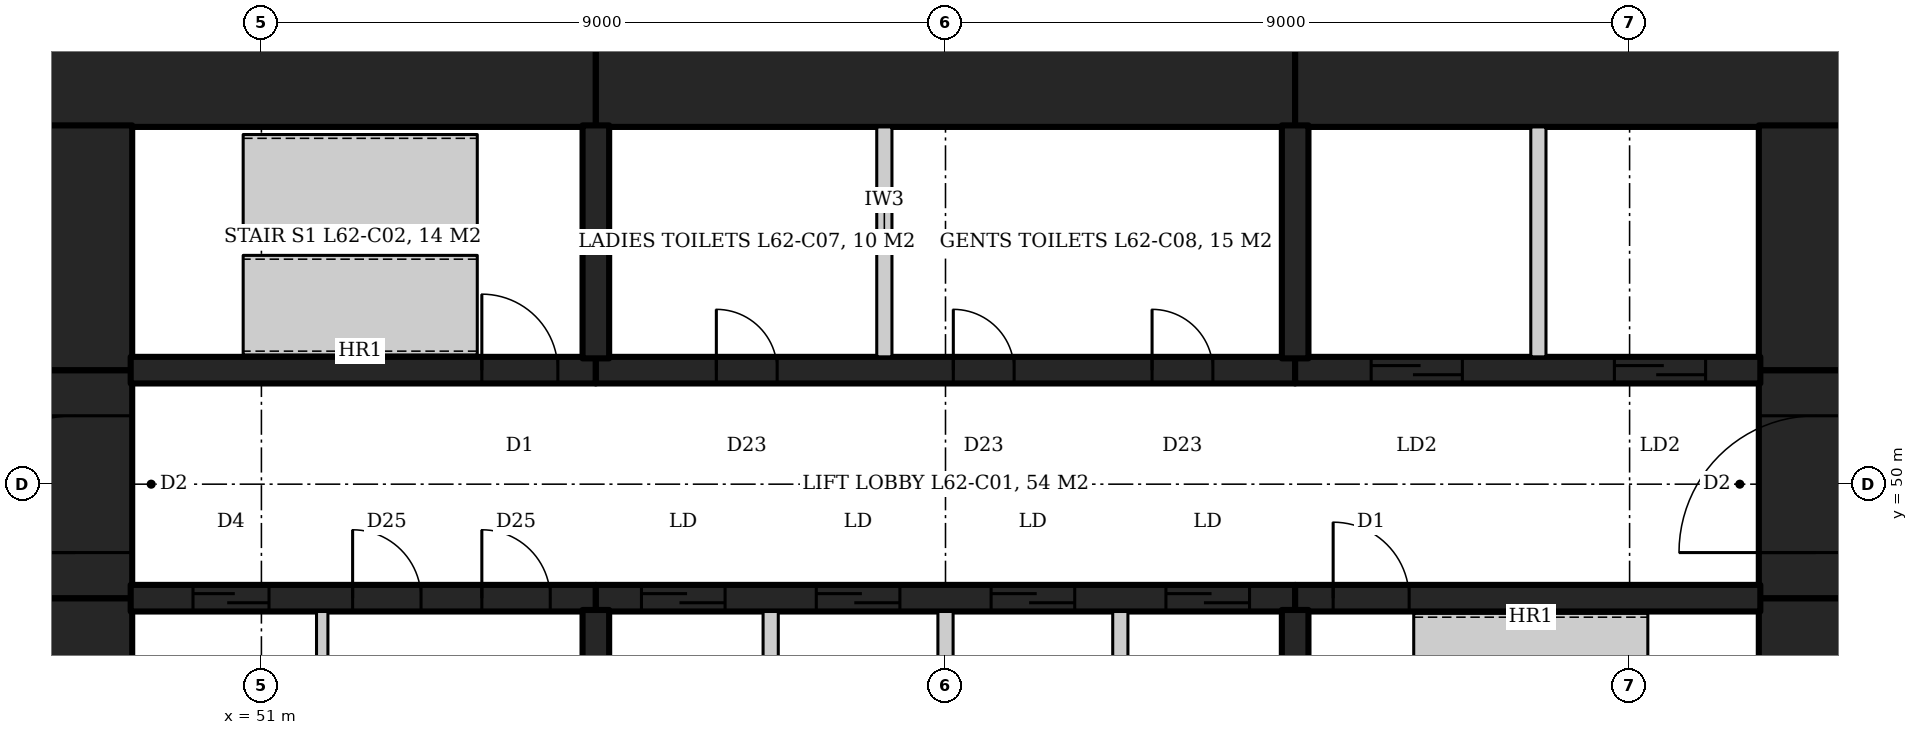
"""IFC4 building model, lengths in metres.
Left out: names, types, materials, properties, quantities, classifications, styles, units other than length and angle.
Written with IfcOpenShell. Run it as: python <this file> out.ifc"""

import sys

from ifc_helpers import new_model, si_unit, direction, frame, frame_2d, origin, place, context, subcontext, project, spatial, rectangle, extrude, element, fill, save


model = new_model("IFC4")
c1 = context("Model", 3, precision=1e-05, world=origin(), true_north=direction((0.0, 1.0)))
c2 = subcontext(c1, "Body", "Model", "MODEL_VIEW")
j1 = project(units=[si_unit("LENGTHUNIT", "METRE"), si_unit("PLANEANGLEUNIT", "RADIAN")], contexts=[c1])
p1 = place(None, origin())
s1 = spatial("IfcSite", under=j1, at=p1, CompositionType="ELEMENT")
p2 = place(p1, origin())
s2 = spatial("IfcBuilding", under=s1, at=p2, CompositionType="ELEMENT")
p3 = place(p2, frame((0.0, 0.0, 269.6)))
s3 = spatial("IfcBuildingStorey", under=s2, at=p3, CompositionType="ELEMENT", Elevation=269.6)
p4 = place(p3, frame((47.8, 55.45, 0.0), z_axis=(0.0, 0.0, 1.0), x_axis=(1.0, 0.0, 0.0)))
e1 = element("IfcWall", 1, at=p4, inside=s3, PredefinedType="SHEAR", context=c2, shape_type="SweptSolid", body=[
    extrude(rectangle(XDim=7.6, YDim=1.5, at=frame_2d((3.8, 0.0))), origin(), (0.0, 0.0, 1.0), 4.2),
])
p5 = place(p3, frame((55.4, 55.45, 0.0), z_axis=(0.0, 0.0, 1.0), x_axis=(1.0, 0.0, 0.0)))
e2 = element("IfcWall", 2, at=p5, inside=s3, PredefinedType="SHEAR", context=c2, shape_type="SweptSolid", body=[
    extrude(rectangle(XDim=9.2, YDim=1.5, at=frame_2d((4.6, 0.0))), origin(), (0.0, 0.0, 1.0), 4.2),
])
p6 = place(p3, frame((64.6, 55.45, 0.0), z_axis=(0.0, 0.0, 1.0), x_axis=(1.0, 0.0, 0.0)))
e3 = element("IfcWall", 3, at=p6, inside=s3, PredefinedType="SHEAR", context=c2, shape_type="SweptSolid", body=[
    extrude(rectangle(XDim=7.6, YDim=1.5, at=frame_2d((3.8, 0.0))), origin(), (0.0, 0.0, 1.0), 4.2),
])
p7 = place(p3, frame((71.45, 45.28, 0.0), z_axis=(0.0, 0.0, 1.0), x_axis=(0.0, 1.0, 0.0)))
e4 = element("IfcWall", 4, at=p7, inside=s3, PredefinedType="SHEAR", context=c2, shape_type="SweptSolid", body=[
    extrude(rectangle(XDim=3.22, YDim=1.5, at=frame_2d((1.61, 0.0))), origin(), (0.0, 0.0, 1.0), 4.2),
])
p8 = place(p3, frame((71.45, 48.5, 0.0), z_axis=(0.0, 0.0, 1.0), x_axis=(0.0, 1.0, 0.0)))
e5 = element("IfcWall", 5, at=p8, inside=s3, PredefinedType="SHEAR", context=c2, shape_type="SweptSolid", body=[
    extrude(rectangle(XDim=3.0, YDim=1.5, at=frame_2d((1.5, 0.0))), origin(), (0.0, 0.0, 1.0), 4.2),
])
p9 = place(p8, frame((0.6, 0.0, 0.0)))
e6 = element("IfcOpeningElement", 6, at=p9, cuts=e5, PredefinedType="OPENING", context=c2, shape_type="SweptSolid", body=[
    extrude(rectangle(XDim=1.8, YDim=2.1, at=frame_2d((0.9, 1.05))), frame((0.0, 0.76, 0.0), z_axis=(0.0, -1.0, 0.0), x_axis=(1.0, 0.0, 0.0)), (0.0, 0.0, 1.0), 1.52),
])
for number, where, z_axis, x_axis in (
    (7, (71.45, 51.5, 0.0), (0.0, 0.0, 1.0), (0.0, 1.0, 0.0)),
    (8, (48.55, 45.28, 0.0), (0.0, 0.0, 1.0), (0.0, 1.0, 0.0)),
):
    element("IfcWall", number, at=place(p3, frame(where, z_axis=z_axis, x_axis=x_axis)), inside=s3, PredefinedType="SHEAR", context=c2, shape_type="SweptSolid", body=[
        extrude(rectangle(XDim=3.22, YDim=1.5, at=frame_2d((1.61, 0.0))), origin(), (0.0, 0.0, 1.0), 4.2),
    ])
p10 = place(p3, frame((48.55, 48.5, 0.0), z_axis=(0.0, 0.0, 1.0), x_axis=(0.0, 1.0, 0.0)))
e9 = element("IfcWall", 9, at=p10, inside=s3, PredefinedType="SHEAR", context=c2, shape_type="SweptSolid", body=[
    extrude(rectangle(XDim=3.0, YDim=1.5, at=frame_2d((1.5, 0.0))), origin(), (0.0, 0.0, 1.0), 4.2),
])
p11 = place(p10, frame((0.6, 0.0, 0.0)))
e10 = element("IfcOpeningElement", 10, at=p11, cuts=e9, PredefinedType="OPENING", context=c2, shape_type="SweptSolid", body=[
    extrude(rectangle(XDim=1.8, YDim=2.1, at=frame_2d((0.9, 1.05))), frame((0.0, 0.76, 0.0), z_axis=(0.0, -1.0, 0.0), x_axis=(1.0, 0.0, 0.0)), (0.0, 0.0, 1.0), 1.52),
])
p12 = place(p3, frame((48.55, 51.5, 0.0), z_axis=(0.0, 0.0, 1.0), x_axis=(0.0, 1.0, 0.0)))
e11 = element("IfcWall", 11, at=p12, inside=s3, PredefinedType="SHEAR", context=c2, shape_type="SweptSolid", body=[
    extrude(rectangle(XDim=3.22, YDim=1.5, at=frame_2d((1.61, 0.0))), origin(), (0.0, 0.0, 1.0), 4.2),
])
p13 = place(p3, frame((49.28, 51.5, 0.0), z_axis=(0.0, 0.0, 1.0), x_axis=(1.0, 0.0, 0.0)))
e12 = element("IfcWall", 12, at=p13, inside=s3, PredefinedType="SHEAR", context=c2, shape_type="SweptSolid", body=[
    extrude(rectangle(XDim=6.12, YDim=0.35, at=frame_2d((3.06, 0.0))), origin(), (0.0, 0.0, 1.0), 4.2),
])
p14 = place(p13, frame((4.62, 0.0, 0.0)))
e13 = element("IfcOpeningElement", 13, at=p14, cuts=e12, PredefinedType="OPENING", context=c2, shape_type="SweptSolid", body=[
    extrude(rectangle(XDim=1.0, YDim=2.1, at=frame_2d((0.5, 1.05))), frame((0.0, 0.185, 0.0), z_axis=(0.0, -1.0, 0.0), x_axis=(1.0, 0.0, 0.0)), (0.0, 0.0, 1.0), 0.37),
])
p15 = place(p3, frame((55.4, 51.5, 0.0), z_axis=(0.0, 0.0, 1.0), x_axis=(1.0, 0.0, 0.0)))
e14 = element("IfcWall", 14, at=p15, inside=s3, PredefinedType="SHEAR", context=c2, shape_type="SweptSolid", body=[
    extrude(rectangle(XDim=9.2, YDim=0.35, at=frame_2d((4.6, 0.0))), origin(), (0.0, 0.0, 1.0), 4.2),
])
p16 = place(p15, frame((1.585, 0.0, 0.0)))
e15 = element("IfcOpeningElement", 15, at=p16, cuts=e14, PredefinedType="OPENING", context=c2, shape_type="SweptSolid", body=[
    extrude(rectangle(XDim=0.8, YDim=2.1, at=frame_2d((0.4, 1.05))), frame((0.0, 0.185, 0.0), z_axis=(0.0, -1.0, 0.0), x_axis=(1.0, 0.0, 0.0)), (0.0, 0.0, 1.0), 0.37),
])
p17 = place(p15, frame((4.703, 0.0, 0.0)))
e16 = element("IfcOpeningElement", 16, at=p17, cuts=e14, PredefinedType="OPENING", context=c2, shape_type="SweptSolid", body=[
    extrude(rectangle(XDim=0.8, YDim=2.1, at=frame_2d((0.4, 1.05))), frame((0.0, 0.185, 0.0), z_axis=(0.0, -1.0, 0.0), x_axis=(1.0, 0.0, 0.0)), (0.0, 0.0, 1.0), 0.37),
])
p18 = place(p15, frame((7.318, 0.0, 0.0)))
e17 = element("IfcOpeningElement", 17, at=p18, cuts=e14, PredefinedType="OPENING", context=c2, shape_type="SweptSolid", body=[
    extrude(rectangle(XDim=0.8, YDim=2.1, at=frame_2d((0.4, 1.05))), frame((0.0, 0.185, 0.0), z_axis=(0.0, -1.0, 0.0), x_axis=(1.0, 0.0, 0.0)), (0.0, 0.0, 1.0), 0.37),
])
p19 = place(p3, frame((64.6, 51.5, 0.0), z_axis=(0.0, 0.0, 1.0), x_axis=(1.0, 0.0, 0.0)))
e18 = element("IfcWall", 18, at=p19, inside=s3, PredefinedType="SHEAR", context=c2, shape_type="SweptSolid", body=[
    extrude(rectangle(XDim=6.12, YDim=0.35, at=frame_2d((3.06, 0.0))), origin(), (0.0, 0.0, 1.0), 4.2),
])
p20 = place(p19, frame((1.0, 0.0, 0.0)))
e19 = element("IfcOpeningElement", 19, at=p20, cuts=e18, PredefinedType="OPENING", context=c2, shape_type="SweptSolid", body=[
    extrude(rectangle(XDim=1.2, YDim=2.1, at=frame_2d((0.6, 1.05))), frame((0.0, 0.185, 0.0), z_axis=(0.0, -1.0, 0.0), x_axis=(1.0, 0.0, 0.0)), (0.0, 0.0, 1.0), 0.37),
])
p21 = place(p19, frame((4.2, 0.0, 0.0)))
e20 = element("IfcOpeningElement", 20, at=p21, cuts=e18, PredefinedType="OPENING", context=c2, shape_type="SweptSolid", body=[
    extrude(rectangle(XDim=1.2, YDim=2.1, at=frame_2d((0.6, 1.05))), frame((0.0, 0.185, 0.0), z_axis=(0.0, -1.0, 0.0), x_axis=(1.0, 0.0, 0.0)), (0.0, 0.0, 1.0), 0.37),
])
p22 = place(p3, frame((49.28, 48.5, 0.0), z_axis=(0.0, 0.0, 1.0), x_axis=(1.0, 0.0, 0.0)))
e21 = element("IfcWall", 21, at=p22, inside=s3, PredefinedType="SHEAR", context=c2, shape_type="SweptSolid", body=[
    extrude(rectangle(XDim=6.12, YDim=0.35, at=frame_2d((3.06, 0.0))), origin(), (0.0, 0.0, 1.0), 4.2),
])
p23 = place(p22, frame((0.82, 0.0, 0.0)))
e22 = element("IfcOpeningElement", 22, at=p23, cuts=e21, PredefinedType="OPENING", context=c2, shape_type="SweptSolid", body=[
    extrude(rectangle(XDim=1.0, YDim=2.1, at=frame_2d((0.5, 1.05))), frame((0.0, 0.185, 0.0), z_axis=(0.0, -1.0, 0.0), x_axis=(1.0, 0.0, 0.0)), (0.0, 0.0, 1.0), 0.37),
])
p24 = place(p22, frame((2.92, 0.0, 0.0)))
e23 = element("IfcOpeningElement", 23, at=p24, cuts=e21, PredefinedType="OPENING", context=c2, shape_type="SweptSolid", body=[
    extrude(rectangle(XDim=0.9, YDim=2.1, at=frame_2d((0.45, 1.05))), frame((0.0, 0.185, 0.0), z_axis=(0.0, -1.0, 0.0), x_axis=(1.0, 0.0, 0.0)), (0.0, 0.0, 1.0), 0.37),
])
p25 = place(p22, frame((4.62, 0.0, 0.0)))
e24 = element("IfcOpeningElement", 24, at=p25, cuts=e21, PredefinedType="OPENING", context=c2, shape_type="SweptSolid", body=[
    extrude(rectangle(XDim=0.9, YDim=2.1, at=frame_2d((0.45, 1.05))), frame((0.0, 0.185, 0.0), z_axis=(0.0, -1.0, 0.0), x_axis=(1.0, 0.0, 0.0)), (0.0, 0.0, 1.0), 0.37),
])
p26 = place(p3, frame((55.4, 48.5, 0.0), z_axis=(0.0, 0.0, 1.0), x_axis=(1.0, 0.0, 0.0)))
e25 = element("IfcWall", 25, at=p26, inside=s3, PredefinedType="SHEAR", context=c2, shape_type="SweptSolid", body=[
    extrude(rectangle(XDim=9.2, YDim=0.35, at=frame_2d((4.6, 0.0))), origin(), (0.0, 0.0, 1.0), 4.2),
])
p27 = place(p26, frame((0.6, 0.0, 0.0)))
e26 = element("IfcOpeningElement", 26, at=p27, cuts=e25, PredefinedType="OPENING", context=c2, shape_type="SweptSolid", body=[
    extrude(rectangle(XDim=1.1, YDim=2.1, at=frame_2d((0.55, 1.05))), frame((0.0, 0.185, 0.0), z_axis=(0.0, -1.0, 0.0), x_axis=(1.0, 0.0, 0.0)), (0.0, 0.0, 1.0), 0.37),
])
p28 = place(p26, frame((2.9, 0.0, 0.0)))
e27 = element("IfcOpeningElement", 27, at=p28, cuts=e25, PredefinedType="OPENING", context=c2, shape_type="SweptSolid", body=[
    extrude(rectangle(XDim=1.1, YDim=2.1, at=frame_2d((0.55, 1.05))), frame((0.0, 0.185, 0.0), z_axis=(0.0, -1.0, 0.0), x_axis=(1.0, 0.0, 0.0)), (0.0, 0.0, 1.0), 0.37),
])
p29 = place(p26, frame((5.2, 0.0, 0.0)))
e28 = element("IfcOpeningElement", 28, at=p29, cuts=e25, PredefinedType="OPENING", context=c2, shape_type="SweptSolid", body=[
    extrude(rectangle(XDim=1.1, YDim=2.1, at=frame_2d((0.55, 1.05))), frame((0.0, 0.185, 0.0), z_axis=(0.0, -1.0, 0.0), x_axis=(1.0, 0.0, 0.0)), (0.0, 0.0, 1.0), 0.37),
])
p30 = place(p26, frame((7.5, 0.0, 0.0)))
e29 = element("IfcOpeningElement", 29, at=p30, cuts=e25, PredefinedType="OPENING", context=c2, shape_type="SweptSolid", body=[
    extrude(rectangle(XDim=1.1, YDim=2.1, at=frame_2d((0.55, 1.05))), frame((0.0, 0.185, 0.0), z_axis=(0.0, -1.0, 0.0), x_axis=(1.0, 0.0, 0.0)), (0.0, 0.0, 1.0), 0.37),
])
p31 = place(p3, frame((64.6, 48.5, 0.0), z_axis=(0.0, 0.0, 1.0), x_axis=(1.0, 0.0, 0.0)))
e30 = element("IfcWall", 30, at=p31, inside=s3, PredefinedType="SHEAR", context=c2, shape_type="SweptSolid", body=[
    extrude(rectangle(XDim=6.12, YDim=0.35, at=frame_2d((3.06, 0.0))), origin(), (0.0, 0.0, 1.0), 4.2),
])
p32 = place(p31, frame((0.5, 0.0, 0.0)))
e31 = element("IfcOpeningElement", 31, at=p32, cuts=e30, PredefinedType="OPENING", context=c2, shape_type="SweptSolid", body=[
    extrude(rectangle(XDim=1.0, YDim=2.1, at=frame_2d((0.5, 1.05))), frame((0.0, 0.185, 0.0), z_axis=(0.0, -1.0, 0.0), x_axis=(1.0, 0.0, 0.0)), (0.0, 0.0, 1.0), 0.37),
])
for number, where, z_axis, x_axis in (
    (32, (55.4, 51.655, 0.0), (0.0, 0.0, 1.0), (0.0, 1.0, 0.0)),
    (33, (64.6, 51.655, 0.0), (0.0, 0.0, 1.0), (0.0, 1.0, 0.0)),
    (34, (55.4, 48.345, 0.0), (0.0, 0.0, 1.0), (0.0, -1.0, 0.0)),
    (35, (64.6, 48.345, 0.0), (0.0, 0.0, 1.0), (0.0, -1.0, 0.0)),
):
    element("IfcWall", number, at=place(p3, frame(where, z_axis=z_axis, x_axis=x_axis)), inside=s3, PredefinedType="SHEAR", context=c2, shape_type="SweptSolid", body=[
        extrude(rectangle(XDim=3.065, YDim=0.35, at=frame_2d((1.532, 0.0))), origin(), (0.0, 0.0, 1.0), 4.2),
    ])
for number, where, z_axis, x_axis in (
    (36, (57.7, 45.3, 0.0), (0.0, 0.0, 1.0), (0.0, 1.0, 0.0)),
    (37, (60.0, 45.3, 0.0), (0.0, 0.0, 1.0), (0.0, 1.0, 0.0)),
    (38, (62.3, 45.3, 0.0), (0.0, 0.0, 1.0), (0.0, 1.0, 0.0)),
    (39, (67.8, 51.675, 0.0), (0.0, 0.0, 1.0), (0.0, 1.0, 0.0)),
):
    element("IfcWall", number, at=place(p3, frame(where, z_axis=z_axis, x_axis=x_axis)), inside=s3, PredefinedType="PARTITIONING", context=c2, shape_type="SweptSolid", body=[
        extrude(rectangle(XDim=3.025, YDim=0.2, at=frame_2d((1.512, 0.0))), origin(), (0.0, 0.0, 1.0), 4.2),
    ])
p33 = place(p3, frame((51.8, 45.3, 0.0), z_axis=(0.0, 0.0, 1.0), x_axis=(0.0, 1.0, 0.0)))
e40 = element("IfcWall", 40, at=p33, inside=s3, PredefinedType="PARTITIONING", context=c2, shape_type="SweptSolid", body=[
    extrude(rectangle(XDim=3.025, YDim=0.15, at=frame_2d((1.512, 0.0))), origin(), (0.0, 0.0, 1.0), 4.04),
])
p34 = place(p3, frame((59.196, 51.675, 0.0), z_axis=(0.0, 0.0, 1.0), x_axis=(0.0, 1.0, 0.0)))
e41 = element("IfcWall", 41, at=p34, inside=s3, PredefinedType="PARTITIONING", context=c2, shape_type="SweptSolid", body=[
    extrude(rectangle(XDim=3.025, YDim=0.2, at=frame_2d((1.512, 0.0))), origin(), (0.0, 0.0, 1.0), 4.04),
])
p35 = place(p14, origin())
e42 = element("IfcDoor", 42, at=p35, inside=s3, OperationType="SINGLE_SWING_LEFT", PredefinedType="DOOR", context=c2, shape_type="SweptSolid", body=[
    extrude(rectangle(XDim=1.0, YDim=2.1, at=frame_2d((0.5, 1.05))), frame((0.0, 0.025, 0.0), z_axis=(0.0, -1.0, 0.0), x_axis=(1.0, 0.0, 0.0)), (0.0, 0.0, 1.0), 0.05),
])
fill(e13, e42)
p36 = place(p32, origin())
e43 = element("IfcDoor", 43, at=p36, inside=s3, OperationType="SINGLE_SWING_LEFT", PredefinedType="DOOR", context=c2, shape_type="SweptSolid", body=[
    extrude(rectangle(XDim=1.0, YDim=2.1, at=frame_2d((0.5, 1.05))), frame((0.0, 0.025, 0.0), z_axis=(0.0, -1.0, 0.0), x_axis=(1.0, 0.0, 0.0)), (0.0, 0.0, 1.0), 0.05),
])
fill(e31, e43)
p37 = place(p20, origin())
e44 = element("IfcDoor", 44, at=p37, inside=s3, OperationType="SLIDING_TO_LEFT", PredefinedType="DOOR", context=c2, shape_type="SweptSolid", body=[
    extrude(rectangle(XDim=1.2, YDim=2.1, at=frame_2d((0.6, 1.05))), frame((0.0, 0.025, 0.0), z_axis=(0.0, -1.0, 0.0), x_axis=(1.0, 0.0, 0.0)), (0.0, 0.0, 1.0), 0.05),
])
fill(e19, e44)
p38 = place(p21, origin())
e45 = element("IfcDoor", 45, at=p38, inside=s3, OperationType="SLIDING_TO_LEFT", PredefinedType="DOOR", context=c2, shape_type="SweptSolid", body=[
    extrude(rectangle(XDim=1.2, YDim=2.1, at=frame_2d((0.6, 1.05))), frame((0.0, 0.025, 0.0), z_axis=(0.0, -1.0, 0.0), x_axis=(1.0, 0.0, 0.0)), (0.0, 0.0, 1.0), 0.05),
])
fill(e20, e45)
p39 = place(p27, origin())
e46 = element("IfcDoor", 46, at=p39, inside=s3, OperationType="SLIDING_TO_LEFT", PredefinedType="DOOR", context=c2, shape_type="SweptSolid", body=[
    extrude(rectangle(XDim=1.1, YDim=2.1, at=frame_2d((0.55, 1.05))), frame((0.0, 0.025, 0.0), z_axis=(0.0, -1.0, 0.0), x_axis=(1.0, 0.0, 0.0)), (0.0, 0.0, 1.0), 0.05),
])
fill(e26, e46)
p40 = place(p28, origin())
e47 = element("IfcDoor", 47, at=p40, inside=s3, OperationType="SLIDING_TO_LEFT", PredefinedType="DOOR", context=c2, shape_type="SweptSolid", body=[
    extrude(rectangle(XDim=1.1, YDim=2.1, at=frame_2d((0.55, 1.05))), frame((0.0, 0.025, 0.0), z_axis=(0.0, -1.0, 0.0), x_axis=(1.0, 0.0, 0.0)), (0.0, 0.0, 1.0), 0.05),
])
fill(e27, e47)
p41 = place(p29, origin())
e48 = element("IfcDoor", 48, at=p41, inside=s3, OperationType="SLIDING_TO_LEFT", PredefinedType="DOOR", context=c2, shape_type="SweptSolid", body=[
    extrude(rectangle(XDim=1.1, YDim=2.1, at=frame_2d((0.55, 1.05))), frame((0.0, 0.025, 0.0), z_axis=(0.0, -1.0, 0.0), x_axis=(1.0, 0.0, 0.0)), (0.0, 0.0, 1.0), 0.05),
])
fill(e28, e48)
p42 = place(p30, origin())
e49 = element("IfcDoor", 49, at=p42, inside=s3, OperationType="SLIDING_TO_LEFT", PredefinedType="DOOR", context=c2, shape_type="SweptSolid", body=[
    extrude(rectangle(XDim=1.1, YDim=2.1, at=frame_2d((0.55, 1.05))), frame((0.0, 0.025, 0.0), z_axis=(0.0, -1.0, 0.0), x_axis=(1.0, 0.0, 0.0)), (0.0, 0.0, 1.0), 0.05),
])
fill(e29, e49)
p43 = place(p23, origin())
e50 = element("IfcDoor", 50, at=p43, inside=s3, OperationType="SLIDING_TO_LEFT", PredefinedType="DOOR", context=c2, shape_type="SweptSolid", body=[
    extrude(rectangle(XDim=1.0, YDim=2.1, at=frame_2d((0.5, 1.05))), frame((0.0, 0.025, 0.0), z_axis=(0.0, -1.0, 0.0), x_axis=(1.0, 0.0, 0.0)), (0.0, 0.0, 1.0), 0.05),
])
fill(e22, e50)
p44 = place(p24, origin())
e51 = element("IfcDoor", 51, at=p44, inside=s3, OperationType="SINGLE_SWING_RIGHT", PredefinedType="DOOR", context=c2, shape_type="SweptSolid", body=[
    extrude(rectangle(XDim=0.9, YDim=2.1, at=frame_2d((0.45, 1.05))), frame((0.0, 0.025, 0.0), z_axis=(0.0, -1.0, 0.0), x_axis=(1.0, 0.0, 0.0)), (0.0, 0.0, 1.0), 0.05),
])
fill(e23, e51)
p45 = place(p25, origin())
e52 = element("IfcDoor", 52, at=p45, inside=s3, OperationType="SINGLE_SWING_RIGHT", PredefinedType="DOOR", context=c2, shape_type="SweptSolid", body=[
    extrude(rectangle(XDim=0.9, YDim=2.1, at=frame_2d((0.45, 1.05))), frame((0.0, 0.025, 0.0), z_axis=(0.0, -1.0, 0.0), x_axis=(1.0, 0.0, 0.0)), (0.0, 0.0, 1.0), 0.05),
])
fill(e24, e52)
p46 = place(p9, origin())
e53 = element("IfcDoor", 53, at=p46, inside=s3, OperationType="DOUBLE_DOOR_DOUBLE_SWING", PredefinedType="DOOR", context=c2, shape_type="SweptSolid", body=[
    extrude(rectangle(XDim=1.8, YDim=2.1, at=frame_2d((0.9, 1.05))), frame((0.0, 0.025, 0.0), z_axis=(0.0, -1.0, 0.0), x_axis=(1.0, 0.0, 0.0)), (0.0, 0.0, 1.0), 0.05),
])
fill(e6, e53)
p47 = place(p11, origin())
e54 = element("IfcDoor", 54, at=p47, inside=s3, OperationType="DOUBLE_DOOR_DOUBLE_SWING", PredefinedType="DOOR", context=c2, shape_type="SweptSolid", body=[
    extrude(rectangle(XDim=1.8, YDim=2.1, at=frame_2d((0.9, 1.05))), frame((0.0, 0.025, 0.0), z_axis=(0.0, -1.0, 0.0), x_axis=(1.0, 0.0, 0.0)), (0.0, 0.0, 1.0), 0.05),
])
fill(e10, e54)
p48 = place(p16, origin())
e55 = element("IfcDoor", 55, at=p48, inside=s3, OperationType="SINGLE_SWING_LEFT", PredefinedType="DOOR", context=c2, shape_type="SweptSolid", body=[
    extrude(rectangle(XDim=0.8, YDim=2.1, at=frame_2d((0.4, 1.05))), frame((0.0, 0.025, 0.0), z_axis=(0.0, -1.0, 0.0), x_axis=(1.0, 0.0, 0.0)), (0.0, 0.0, 1.0), 0.05),
])
fill(e15, e55)
p49 = place(p17, origin())
e56 = element("IfcDoor", 56, at=p49, inside=s3, OperationType="SINGLE_SWING_LEFT", PredefinedType="DOOR", context=c2, shape_type="SweptSolid", body=[
    extrude(rectangle(XDim=0.8, YDim=2.1, at=frame_2d((0.4, 1.05))), frame((0.0, 0.025, 0.0), z_axis=(0.0, -1.0, 0.0), x_axis=(1.0, 0.0, 0.0)), (0.0, 0.0, 1.0), 0.05),
])
fill(e16, e56)
p50 = place(p18, origin())
e57 = element("IfcDoor", 57, at=p50, inside=s3, OperationType="SINGLE_SWING_LEFT", PredefinedType="DOOR", context=c2, shape_type="SweptSolid", body=[
    extrude(rectangle(XDim=0.8, YDim=2.1, at=frame_2d((0.4, 1.05))), frame((0.0, 0.025, 0.0), z_axis=(0.0, -1.0, 0.0), x_axis=(1.0, 0.0, 0.0)), (0.0, 0.0, 1.0), 0.05),
])
fill(e17, e57)
save(model, sys.argv[1])
